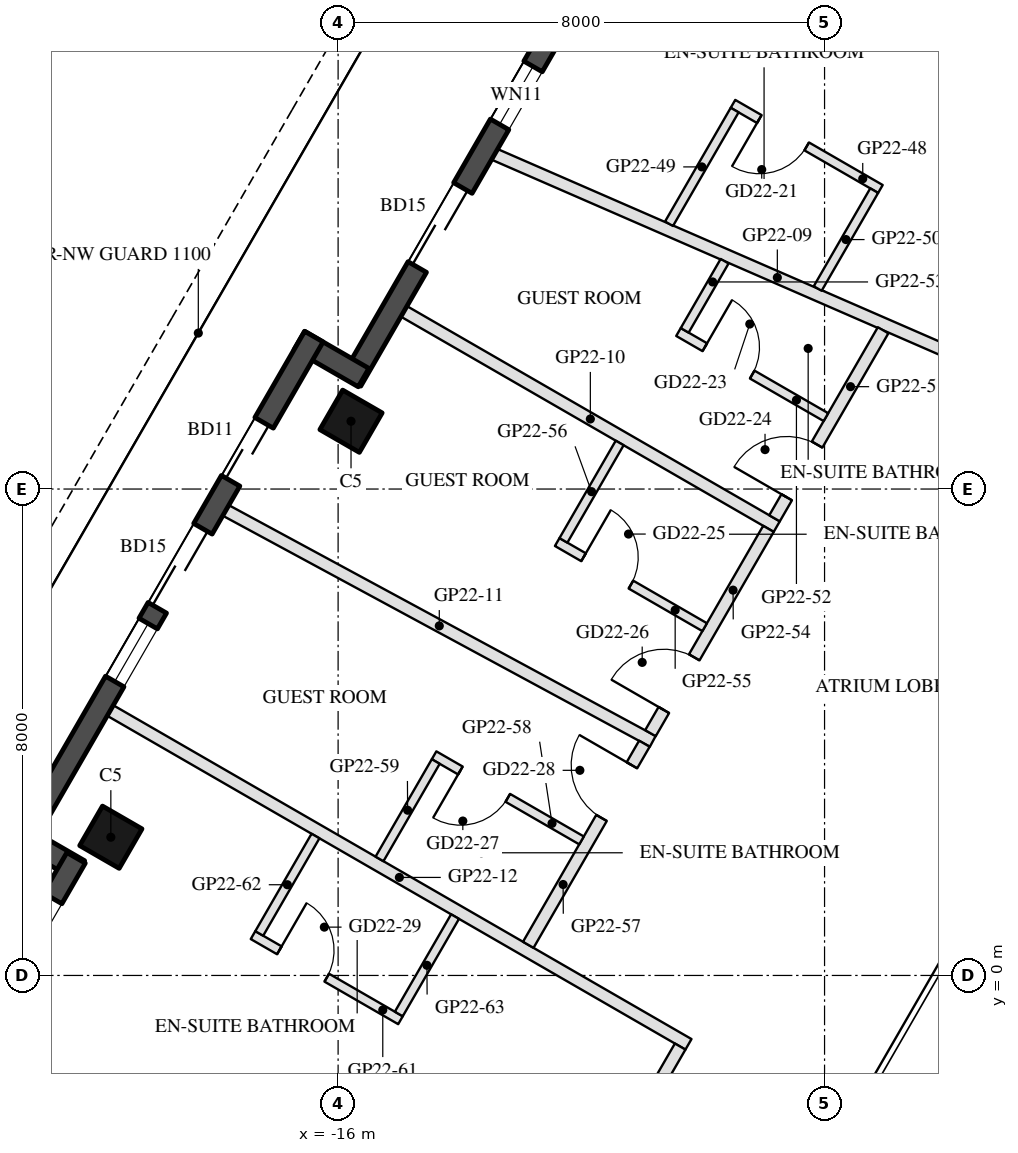
"""IFC4 building model, lengths in metres.
Left out: names, types, materials, properties, quantities, classifications, styles, units other than length and angle.
Written with IfcOpenShell. Run it as: python <this file> out.ifc"""

import sys

from ifc_helpers import new_model, si_unit, direction, frame, frame_2d, origin, origin_2d, place, context, subcontext, project, spatial, rectangle, hollow_rectangle, extrude, element, fill, save


model = new_model("IFC4")
c1 = context("Model", 3, precision=1e-05, world=origin(), true_north=direction((0.0, 1.0)))
c2 = subcontext(c1, "Body", "Model", "MODEL_VIEW")
j1 = project(units=[si_unit("LENGTHUNIT", "METRE"), si_unit("PLANEANGLEUNIT", "RADIAN")], contexts=[c1])
p1 = place(None, origin())
s1 = spatial("IfcSite", under=j1, at=p1, CompositionType="ELEMENT")
p2 = place(p1, origin())
s2 = spatial("IfcBuilding", under=s1, at=p2, CompositionType="ELEMENT")
p3 = place(p2, frame((0.0, 0.0, 228.0)))
s3 = spatial("IfcBuildingStorey", under=s2, at=p3, CompositionType="ELEMENT", Elevation=228.0)
for number, where, z_axis, x_axis in (
    (1, (-15.788, 9.115, 0.0), (0.0, 0.0, 1.0), (0.5, 0.866, 0.0)),
    (2, (-19.738, 2.273, 0.0), (0.0, 0.0, 1.0), (0.5, 0.866, 0.0)),
):
    element("IfcColumn", number, at=place(p3, frame(where, z_axis=z_axis, x_axis=x_axis)), inside=s3, PredefinedType="COLUMN", context=c2, shape_type="SweptSolid", body=[
        extrude(hollow_rectangle(XDim=0.75, YDim=0.75, WallThickness=0.035, at=origin_2d()), origin(), (0.0, 0.0, 1.0), 3.7),
    ])
p4 = place(p3, frame((-12.409, 15.617, 0.0), z_axis=(0.0, 0.0, 1.0), x_axis=(-0.500003597184, -0.866023326939, 0.0)))
e3 = element("IfcWall", 3, at=p4, inside=s3, PredefinedType="SOLIDWALL", context=c2, shape_type="SweptSolid", body=[
    extrude(rectangle(XDim=6.74, YDim=0.35, at=frame_2d((3.37, 0.0))), origin(), (0.0, 0.0, 1.0), 3.45),
])
p5 = place(p4, frame((0.77, 0.0, 0.3)))
e4 = element("IfcOpeningElement", 4, at=p5, cuts=e3, PredefinedType="OPENING", context=c2, shape_type="SweptSolid", body=[
    extrude(rectangle(XDim=1.1, YDim=2.65, at=frame_2d((0.55, 1.325))), frame((0.0, 0.185, 0.0), z_axis=(0.0, -1.0, 0.0), x_axis=(1.0, 0.0, 0.0)), (0.0, 0.0, 1.0), 0.37),
])
p6 = place(p4, frame((3.079, 0.0, 0.0)))
e5 = element("IfcOpeningElement", 5, at=p6, cuts=e3, PredefinedType="OPENING", context=c2, shape_type="SweptSolid", body=[
    extrude(rectangle(XDim=1.5, YDim=2.4, at=frame_2d((0.75, 1.2))), frame((0.0, 0.185, 0.0), z_axis=(0.0, -1.0, 0.0), x_axis=(1.0, 0.0, 0.0)), (0.0, 0.0, 1.0), 0.37),
])
p7 = place(p3, frame((-15.581, 9.833, 0.0), z_axis=(0.0, 0.0, 1.0), x_axis=(-0.866055662726, 0.499947586314, 0.0)))
e6 = element("IfcWall", 6, at=p7, inside=s3, PredefinedType="SOLIDWALL", context=c2, shape_type="SweptSolid", body=[
    extrude(rectangle(XDim=1.22, YDim=0.35, at=frame_2d((0.61, 0.0))), origin(), (0.0, 0.0, 1.0), 3.45),
])
p8 = place(p3, frame((-16.398, 10.507, 0.0), z_axis=(0.0, 0.0, 1.0), x_axis=(-0.499999142773, -0.866025898704, 0.0)))
e7 = element("IfcWall", 7, at=p8, inside=s3, PredefinedType="SOLIDWALL", context=c2, shape_type="SweptSolid", body=[
    extrude(rectangle(XDim=9.7, YDim=0.35, at=frame_2d((4.85, 0.0))), origin(), (0.0, 0.0, 1.0), 3.45),
])
p9 = place(p8, frame((1.638, 0.0, 0.0)))
e8 = element("IfcOpeningElement", 8, at=p9, cuts=e7, PredefinedType="OPENING", context=c2, shape_type="SweptSolid", body=[
    extrude(rectangle(XDim=1.1, YDim=2.4, at=frame_2d((0.55, 1.2))), frame((0.0, 0.185, 0.0), z_axis=(0.0, -1.0, 0.0), x_axis=(1.0, 0.0, 0.0)), (0.0, 0.0, 1.0), 0.37),
])
p10 = place(p8, frame((3.65, 0.0, 0.0)))
e9 = element("IfcOpeningElement", 9, at=p10, cuts=e7, PredefinedType="OPENING", context=c2, shape_type="SweptSolid", body=[
    extrude(rectangle(XDim=1.5, YDim=2.4, at=frame_2d((0.75, 1.2))), frame((0.0, 0.185, 0.0), z_axis=(0.0, -1.0, 0.0), x_axis=(1.0, 0.0, 0.0)), (0.0, 0.0, 1.0), 0.37),
])
p11 = place(p8, frame((5.45, 0.0, 0.3)))
e10 = element("IfcOpeningElement", 10, at=p11, cuts=e7, PredefinedType="OPENING", context=c2, shape_type="SweptSolid", body=[
    extrude(rectangle(XDim=1.1, YDim=2.65, at=frame_2d((0.55, 1.325))), frame((0.0, 0.185, 0.0), z_axis=(0.0, -1.0, 0.0), x_axis=(1.0, 0.0, 0.0)), (0.0, 0.0, 1.0), 0.37),
])
p12 = place(p3, frame((-21.312, 2.346, 0.0), z_axis=(0.0, 0.0, 1.0), x_axis=(0.866005645448, -0.500034220881, 0.0)))
e11 = element("IfcWall", 11, at=p12, inside=s3, PredefinedType="SOLIDWALL", context=c2, shape_type="SweptSolid", body=[
    extrude(rectangle(XDim=1.22, YDim=0.35, at=frame_2d((0.61, 0.0))), origin(), (0.0, 0.0, 1.0), 3.45),
])
p13 = place(p3, frame((-20.309, 1.934, 0.0), z_axis=(0.0, 0.0, 1.0), x_axis=(-0.499992114976, -0.866029956157, 0.0)))
e12 = element("IfcWall", 12, at=p13, inside=s3, PredefinedType="SOLIDWALL", context=c2, shape_type="SweptSolid", body=[
    extrude(rectangle(XDim=6.74, YDim=0.35, at=frame_2d((3.37, 0.0))), origin(), (0.0, 0.0, 1.0), 3.45),
])
p14 = place(p13, frame((4.02, 0.0, 0.0)))
e13 = element("IfcOpeningElement", 13, at=p14, cuts=e12, PredefinedType="OPENING", context=c2, shape_type="SweptSolid", body=[
    extrude(rectangle(XDim=2.4, YDim=2.4, at=frame_2d((1.2, 1.2))), frame((0.0, 0.185, 0.0), z_axis=(0.0, -1.0, 0.0), x_axis=(1.0, 0.0, 0.0)), (0.0, 0.0, 1.0), 0.37),
])
p15 = place(p13, frame((0.77, 0.0, 0.3)))
e14 = element("IfcOpeningElement", 14, at=p15, cuts=e12, PredefinedType="OPENING", context=c2, shape_type="SweptSolid", body=[
    extrude(rectangle(XDim=2.9, YDim=2.65, at=frame_2d((1.45, 1.325))), frame((0.0, 0.185, 0.0), z_axis=(0.0, -1.0, 0.0), x_axis=(1.0, 0.0, 0.0)), (0.0, 0.0, 1.0), 0.37),
])
p16 = place(p3, frame((-13.427, 13.504, 0.0), z_axis=(0.0, 0.0, 1.0), x_axis=(0.916759471343, -0.399439697204, 0.0)))
e15 = element("IfcWall", 15, at=p16, inside=s3, PredefinedType="PARTITIONING", context=c2, shape_type="SweptSolid", body=[
    extrude(rectangle(XDim=10.144, YDim=0.2, at=frame_2d((5.072, 0.0))), origin(), (0.0, 0.0, 1.0), 2.96),
])
p17 = place(p3, frame((-14.917, 10.922, 0.0), z_axis=(0.0, 0.0, 1.0), x_axis=(0.866019052629, -0.500011000363, 0.0)))
e16 = element("IfcWall", 16, at=p17, inside=s3, PredefinedType="PARTITIONING", context=c2, shape_type="SweptSolid", body=[
    extrude(rectangle(XDim=7.08, YDim=0.2, at=frame_2d((3.54, 0.0))), origin(), (0.0, 0.0, 1.0), 2.96),
])
p18 = place(p3, frame((-17.847, 7.648, 0.0), z_axis=(0.0, 0.0, 1.0), x_axis=(0.879604495132, -0.475705720109, 0.0)))
e17 = element("IfcWall", 17, at=p18, inside=s3, PredefinedType="PARTITIONING", context=c2, shape_type="SweptSolid", body=[
    extrude(rectangle(XDim=7.983, YDim=0.2, at=frame_2d((3.992, 0.0))), origin(), (0.0, 0.0, 1.0), 2.96),
])
p19 = place(p3, frame((-19.747, 4.357, 0.0), z_axis=(0.0, 0.0, 1.0), x_axis=(0.866027479907, -0.499996404033, 0.0)))
e18 = element("IfcWall", 18, at=p19, inside=s3, PredefinedType="PARTITIONING", context=c2, shape_type="SweptSolid", body=[
    extrude(rectangle(XDim=10.98, YDim=0.2, at=frame_2d((5.49, 0.0))), origin(), (0.0, 0.0, 1.0), 2.96),
])
p20 = place(p3, frame((-7.081, 12.935, 0.0), z_axis=(0.0, 0.0, 1.0), x_axis=(-0.866056369097, 0.49994636267, 0.0)))
e19 = element("IfcWall", 19, at=p20, inside=s3, PredefinedType="PARTITIONING", context=c2, shape_type="SweptSolid", body=[
    extrude(rectangle(XDim=2.8, YDim=0.15, at=frame_2d((1.4, 0.0))), origin(), (0.0, 0.0, 1.0), 3.45),
])
p21 = place(p20, frame((1.4, 0.0, 0.0)))
e20 = element("IfcOpeningElement", 20, at=p21, cuts=e19, PredefinedType="OPENING", context=c2, shape_type="SweptSolid", body=[
    extrude(rectangle(XDim=0.9, YDim=2.1, at=frame_2d((0.45, 1.05))), frame((0.0, 0.085, 0.0), z_axis=(0.0, -1.0, 0.0), x_axis=(1.0, 0.0, 0.0)), (0.0, 0.0, 1.0), 0.17),
])
p22 = place(p3, frame((-9.479, 14.233, 0.0), z_axis=(0.0, 0.0, 1.0), x_axis=(-0.499983569942, -0.866034889475, 0.0)))
e21 = element("IfcWall", 21, at=p22, inside=s3, PredefinedType="PARTITIONING", context=c2, shape_type="SweptSolid", body=[
    extrude(rectangle(XDim=2.158, YDim=0.15, at=frame_2d((1.079, 0.0))), origin(), (0.0, 0.0, 1.0), 3.45),
])
p23 = place(p3, frame((-7.184, 12.908, 0.0), z_axis=(0.0, 0.0, 1.0), x_axis=(-0.49995366312, -0.866052154742, 0.0)))
e22 = element("IfcWall", 22, at=p23, inside=s3, PredefinedType="PARTITIONING", context=c2, shape_type="SweptSolid", body=[
    extrude(rectangle(XDim=1.859, YDim=0.15, at=frame_2d((0.929, 0.0))), origin(), (0.0, 0.0, 1.0), 3.45),
])
p24 = place(p3, frame((-8.823, 7.519, 0.0), z_axis=(0.0, 0.0, 1.0), x_axis=(0.500036104519, 0.866004557827, 0.0)))
e23 = element("IfcWall", 23, at=p24, inside=s3, PredefinedType="PARTITIONING", context=c2, shape_type="SweptSolid", body=[
    extrude(rectangle(XDim=3.571, YDim=0.2, at=frame_2d((1.786, 0.0))), origin(), (0.0, 0.0, 1.0), 2.76),
])
p25 = place(p24, frame((0.4, 0.0, 0.0)))
e24 = element("IfcOpeningElement", 24, at=p25, cuts=e23, PredefinedType="OPENING", context=c2, shape_type="SweptSolid", body=[
    extrude(rectangle(XDim=1.0, YDim=2.1, at=frame_2d((0.5, 1.05))), frame((0.0, 0.11, 0.0), z_axis=(0.0, -1.0, 0.0), x_axis=(1.0, 0.0, 0.0)), (0.0, 0.0, 1.0), 0.22),
])
p26 = place(p3, frame((-10.402, 10.583, 0.0), z_axis=(0.0, 0.0, 1.0), x_axis=(0.866034573852, -0.49998411664, 0.0)))
e25 = element("IfcWall", 25, at=p26, inside=s3, PredefinedType="PARTITIONING", context=c2, shape_type="SweptSolid", body=[
    extrude(rectangle(XDim=2.8, YDim=0.15, at=frame_2d((1.4, 0.0))), origin(), (0.0, 0.0, 1.0), 2.76),
])
p27 = place(p26, frame((0.5, 0.0, 0.0)))
e26 = element("IfcOpeningElement", 26, at=p27, cuts=e25, PredefinedType="OPENING", context=c2, shape_type="SweptSolid", body=[
    extrude(rectangle(XDim=0.9, YDim=2.1, at=frame_2d((0.45, 1.05))), frame((0.0, 0.085, 0.0), z_axis=(0.0, -1.0, 0.0), x_axis=(1.0, 0.0, 0.0)), (0.0, 0.0, 1.0), 0.17),
])
p28 = place(p3, frame((-9.644, 11.747, 0.0), z_axis=(0.0, 0.0, 1.0), x_axis=(-0.499899541988, -0.866083395476, 0.0)))
e27 = element("IfcWall", 27, at=p28, inside=s3, PredefinedType="PARTITIONING", context=c2, shape_type="SweptSolid", body=[
    extrude(rectangle(XDim=1.313, YDim=0.15, at=frame_2d((0.656, 0.0))), origin(), (0.0, 0.0, 1.0), 2.76),
])
p29 = place(p3, frame((-10.863, 3.985, 0.0), z_axis=(0.0, 0.0, 1.0), x_axis=(0.500009256921, 0.866020059232, 0.0)))
e28 = element("IfcWall", 28, at=p29, inside=s3, PredefinedType="PARTITIONING", context=c2, shape_type="SweptSolid", body=[
    extrude(rectangle(XDim=3.881, YDim=0.2, at=frame_2d((1.94, 0.0))), origin(), (0.0, 0.0, 1.0), 2.76),
])
p30 = place(p29, frame((0.44, 0.0, 0.0)))
e29 = element("IfcOpeningElement", 29, at=p30, cuts=e28, PredefinedType="OPENING", context=c2, shape_type="SweptSolid", body=[
    extrude(rectangle(XDim=1.0, YDim=2.1, at=frame_2d((0.5, 1.05))), frame((0.0, 0.11, 0.0), z_axis=(0.0, -1.0, 0.0), x_axis=(1.0, 0.0, 0.0)), (0.0, 0.0, 1.0), 0.22),
])
p31 = place(p3, frame((-12.397, 7.128, 0.0), z_axis=(0.0, 0.0, 1.0), x_axis=(0.866018616679, -0.500011755427, 0.0)))
e30 = element("IfcWall", 30, at=p31, inside=s3, PredefinedType="PARTITIONING", context=c2, shape_type="SweptSolid", body=[
    extrude(rectangle(XDim=2.8, YDim=0.15, at=frame_2d((1.4, 0.0))), origin(), (0.0, 0.0, 1.0), 2.76),
])
p32 = place(p31, frame((0.5, 0.0, 0.0)))
e31 = element("IfcOpeningElement", 31, at=p32, cuts=e30, PredefinedType="OPENING", context=c2, shape_type="SweptSolid", body=[
    extrude(rectangle(XDim=0.9, YDim=2.1, at=frame_2d((0.45, 1.05))), frame((0.0, 0.085, 0.0), z_axis=(0.0, -1.0, 0.0), x_axis=(1.0, 0.0, 0.0)), (0.0, 0.0, 1.0), 0.17),
])
p33 = place(p3, frame((-11.369, 8.758, 0.0), z_axis=(0.0, 0.0, 1.0), x_axis=(-0.500042316284, -0.866000971088, 0.0)))
e32 = element("IfcWall", 32, at=p33, inside=s3, PredefinedType="PARTITIONING", context=c2, shape_type="SweptSolid", body=[
    extrude(rectangle(XDim=1.85, YDim=0.15, at=frame_2d((0.925, 0.0))), origin(), (0.0, 0.0, 1.0), 2.76),
])
p34 = place(p3, frame((-12.873, 0.504, 0.0), z_axis=(0.0, 0.0, 1.0), x_axis=(0.500030487836, 0.866007800909, 0.0)))
e33 = element("IfcWall", 33, at=p34, inside=s3, PredefinedType="PARTITIONING", context=c2, shape_type="SweptSolid", body=[
    extrude(rectangle(XDim=3.819, YDim=0.2, at=frame_2d((1.91, 0.0))), origin(), (0.0, 0.0, 1.0), 2.76),
])
p35 = place(p34, frame((2.41, 0.0, 0.0)))
e34 = element("IfcOpeningElement", 34, at=p35, cuts=e33, PredefinedType="OPENING", context=c2, shape_type="SweptSolid", body=[
    extrude(rectangle(XDim=1.0, YDim=2.1, at=frame_2d((0.5, 1.05))), frame((0.0, 0.11, 0.0), z_axis=(0.0, -1.0, 0.0), x_axis=(1.0, 0.0, 0.0)), (0.0, 0.0, 1.0), 0.22),
])
p36 = place(p3, frame((-11.997, 2.221, 0.0), z_axis=(0.0, 0.0, 1.0), x_axis=(-0.866034573852, 0.49998411664, 0.0)))
e35 = element("IfcWall", 35, at=p36, inside=s3, PredefinedType="PARTITIONING", context=c2, shape_type="SweptSolid", body=[
    extrude(rectangle(XDim=2.8, YDim=0.15, at=frame_2d((1.4, 0.0))), origin(), (0.0, 0.0, 1.0), 2.76),
])
p37 = place(p36, frame((1.4, 0.0, 0.0)))
e36 = element("IfcOpeningElement", 36, at=p37, cuts=e35, PredefinedType="OPENING", context=c2, shape_type="SweptSolid", body=[
    extrude(rectangle(XDim=0.9, YDim=2.1, at=frame_2d((0.45, 1.05))), frame((0.0, 0.085, 0.0), z_axis=(0.0, -1.0, 0.0), x_axis=(1.0, 0.0, 0.0)), (0.0, 0.0, 1.0), 0.17),
])
p38 = place(p3, frame((-14.394, 3.519, 0.0), z_axis=(0.0, 0.0, 1.0), x_axis=(-0.499886193382, -0.866091100096, 0.0)))
e37 = element("IfcWall", 37, at=p38, inside=s3, PredefinedType="PARTITIONING", context=c2, shape_type="SweptSolid", body=[
    extrude(rectangle(XDim=1.85, YDim=0.15, at=frame_2d((0.925, 0.0))), origin(), (0.0, 0.0, 1.0), 3.45),
])
p39 = place(p3, frame((-12.269, -4.45, 0.0), z_axis=(0.0, 0.0, 1.0), x_axis=(0.500055316652, 0.865993464345, 0.0)))
e38 = element("IfcWall", 38, at=p39, inside=s3, PredefinedType="PARTITIONING", context=c2, shape_type="SweptSolid", body=[
    extrude(rectangle(XDim=3.788, YDim=0.2, at=frame_2d((1.894, 0.0))), origin(), (0.0, 0.0, 1.0), 2.76),
])
p40 = place(p39, frame((1.394, 0.0, 0.0)))
e39 = element("IfcOpeningElement", 39, at=p40, cuts=e38, PredefinedType="OPENING", context=c2, shape_type="SweptSolid", body=[
    extrude(rectangle(XDim=1.0, YDim=2.1, at=frame_2d((0.5, 1.05))), frame((0.0, 0.11, 0.0), z_axis=(0.0, -1.0, 0.0), x_axis=(1.0, 0.0, 0.0)), (0.0, 0.0, 1.0), 0.22),
])
p41 = place(p3, frame((-17.399, 0.664, 0.0), z_axis=(0.0, 0.0, 1.0), x_axis=(0.866018616679, -0.500011755427, 0.0)))
e40 = element("IfcWall", 40, at=p41, inside=s3, PredefinedType="PARTITIONING", context=c2, shape_type="SweptSolid", body=[
    extrude(rectangle(XDim=2.8, YDim=0.15, at=frame_2d((1.4, 0.0))), origin(), (0.0, 0.0, 1.0), 3.45),
])
p42 = place(p41, frame((0.5, 0.0, 0.0)))
e41 = element("IfcOpeningElement", 41, at=p42, cuts=e40, PredefinedType="OPENING", context=c2, shape_type="SweptSolid", body=[
    extrude(rectangle(XDim=0.9, YDim=2.1, at=frame_2d((0.45, 1.05))), frame((0.0, 0.085, 0.0), z_axis=(0.0, -1.0, 0.0), x_axis=(1.0, 0.0, 0.0)), (0.0, 0.0, 1.0), 0.17),
])
p43 = place(p3, frame((-16.372, 2.293, 0.0), z_axis=(0.0, 0.0, 1.0), x_axis=(-0.499985172903, -0.866033964044, 0.0)))
e42 = element("IfcWall", 42, at=p43, inside=s3, PredefinedType="PARTITIONING", context=c2, shape_type="SweptSolid", body=[
    extrude(rectangle(XDim=1.85, YDim=0.15, at=frame_2d((0.925, 0.0))), origin(), (0.0, 0.0, 1.0), 2.76),
])
p44 = place(p3, frame((-14.077, 0.968, 0.0), z_axis=(0.0, 0.0, 1.0), x_axis=(-0.500042316284, -0.866000971088, 0.0)))
e43 = element("IfcWall", 43, at=p44, inside=s3, PredefinedType="PARTITIONING", context=c2, shape_type="SweptSolid", body=[
    extrude(rectangle(XDim=1.85, YDim=0.15, at=frame_2d((0.925, 0.0))), origin(), (0.0, 0.0, 1.0), 2.76),
])
p45 = place(p5, origin())
e44 = element("IfcWindow", 44, at=p45, inside=s3, PartitioningType="SINGLE_PANEL", PredefinedType="WINDOW", context=c2, shape_type="SweptSolid", body=[
    extrude(rectangle(XDim=1.1, YDim=2.65, at=frame_2d((0.55, 1.325))), frame((0.0, 0.03, 0.0), z_axis=(0.0, -1.0, 0.0), x_axis=(1.0, 0.0, 0.0)), (0.0, 0.0, 1.0), 0.06),
])
fill(e4, e44)
p46 = place(p6, frame((1.5, 0.0, 0.0), z_axis=(0.0, 0.0, 1.0), x_axis=(-1.0, 0.0, 0.0)))
e45 = element("IfcDoor", 45, at=p46, inside=s3, OperationType="SLIDING_TO_LEFT", PredefinedType="DOOR", context=c2, shape_type="SweptSolid", body=[
    extrude(rectangle(XDim=1.5, YDim=2.4, at=frame_2d((0.75, 1.2))), frame((0.0, 0.025, 0.0), z_axis=(0.0, -1.0, 0.0), x_axis=(1.0, 0.0, 0.0)), (0.0, 0.0, 1.0), 0.05),
])
fill(e5, e45)
p47 = place(p9, frame((1.1, 0.0, 0.0), z_axis=(0.0, 0.0, 1.0), x_axis=(-1.0, 0.0, 0.0)))
e46 = element("IfcDoor", 46, at=p47, inside=s3, OperationType="SLIDING_TO_LEFT", PredefinedType="DOOR", context=c2, shape_type="SweptSolid", body=[
    extrude(rectangle(XDim=1.1, YDim=2.4, at=frame_2d((0.55, 1.2))), frame((0.0, 0.025, 0.0), z_axis=(0.0, -1.0, 0.0), x_axis=(1.0, 0.0, 0.0)), (0.0, 0.0, 1.0), 0.05),
])
fill(e8, e46)
p48 = place(p10, frame((1.5, 0.0, 0.0), z_axis=(0.0, 0.0, 1.0), x_axis=(-1.0, 0.0, 0.0)))
e47 = element("IfcDoor", 47, at=p48, inside=s3, OperationType="SLIDING_TO_LEFT", PredefinedType="DOOR", context=c2, shape_type="SweptSolid", body=[
    extrude(rectangle(XDim=1.5, YDim=2.4, at=frame_2d((0.75, 1.2))), frame((0.0, 0.025, 0.0), z_axis=(0.0, -1.0, 0.0), x_axis=(1.0, 0.0, 0.0)), (0.0, 0.0, 1.0), 0.05),
])
fill(e9, e47)
p49 = place(p11, origin())
e48 = element("IfcWindow", 48, at=p49, inside=s3, PartitioningType="SINGLE_PANEL", PredefinedType="WINDOW", context=c2, shape_type="SweptSolid", body=[
    extrude(rectangle(XDim=1.1, YDim=2.65, at=frame_2d((0.55, 1.325))), frame((0.0, 0.03, 0.0), z_axis=(0.0, -1.0, 0.0), x_axis=(1.0, 0.0, 0.0)), (0.0, 0.0, 1.0), 0.06),
])
fill(e10, e48)
p50 = place(p15, origin())
e49 = element("IfcWindow", 49, at=p50, inside=s3, PartitioningType="SINGLE_PANEL", PredefinedType="WINDOW", context=c2, shape_type="SweptSolid", body=[
    extrude(rectangle(XDim=2.9, YDim=2.65, at=frame_2d((1.45, 1.325))), frame((0.0, 0.03, 0.0), z_axis=(0.0, -1.0, 0.0), x_axis=(1.0, 0.0, 0.0)), (0.0, 0.0, 1.0), 0.06),
])
fill(e14, e49)
p51 = place(p21, origin())
e50 = element("IfcDoor", 50, at=p51, inside=s3, OperationType="SINGLE_SWING_RIGHT", PredefinedType="DOOR", context=c2, shape_type="SweptSolid", body=[
    extrude(rectangle(XDim=0.9, YDim=2.1, at=frame_2d((0.45, 1.05))), frame((0.0, 0.025, 0.0), z_axis=(0.0, -1.0, 0.0), x_axis=(1.0, 0.0, 0.0)), (0.0, 0.0, 1.0), 0.05),
])
fill(e20, e50)
p52 = place(p27, origin())
e51 = element("IfcDoor", 51, at=p52, inside=s3, OperationType="SINGLE_SWING_LEFT", PredefinedType="DOOR", context=c2, shape_type="SweptSolid", body=[
    extrude(rectangle(XDim=0.9, YDim=2.1, at=frame_2d((0.45, 1.05))), frame((0.0, 0.025, 0.0), z_axis=(0.0, -1.0, 0.0), x_axis=(1.0, 0.0, 0.0)), (0.0, 0.0, 1.0), 0.05),
])
fill(e26, e51)
p53 = place(p25, origin())
e52 = element("IfcDoor", 52, at=p53, inside=s3, OperationType="SINGLE_SWING_LEFT", PredefinedType="DOOR", context=c2, shape_type="SweptSolid", body=[
    extrude(rectangle(XDim=1.0, YDim=2.1, at=frame_2d((0.5, 1.05))), frame((0.0, 0.025, 0.0), z_axis=(0.0, -1.0, 0.0), x_axis=(1.0, 0.0, 0.0)), (0.0, 0.0, 1.0), 0.05),
])
fill(e24, e52)
p54 = place(p32, origin())
e53 = element("IfcDoor", 53, at=p54, inside=s3, OperationType="SINGLE_SWING_LEFT", PredefinedType="DOOR", context=c2, shape_type="SweptSolid", body=[
    extrude(rectangle(XDim=0.9, YDim=2.1, at=frame_2d((0.45, 1.05))), frame((0.0, 0.025, 0.0), z_axis=(0.0, -1.0, 0.0), x_axis=(1.0, 0.0, 0.0)), (0.0, 0.0, 1.0), 0.05),
])
fill(e31, e53)
p55 = place(p30, origin())
e54 = element("IfcDoor", 54, at=p55, inside=s3, OperationType="SINGLE_SWING_LEFT", PredefinedType="DOOR", context=c2, shape_type="SweptSolid", body=[
    extrude(rectangle(XDim=1.0, YDim=2.1, at=frame_2d((0.5, 1.05))), frame((0.0, 0.025, 0.0), z_axis=(0.0, -1.0, 0.0), x_axis=(1.0, 0.0, 0.0)), (0.0, 0.0, 1.0), 0.05),
])
fill(e29, e54)
p56 = place(p37, origin())
e55 = element("IfcDoor", 55, at=p56, inside=s3, OperationType="SINGLE_SWING_RIGHT", PredefinedType="DOOR", context=c2, shape_type="SweptSolid", body=[
    extrude(rectangle(XDim=0.9, YDim=2.1, at=frame_2d((0.45, 1.05))), frame((0.0, 0.025, 0.0), z_axis=(0.0, -1.0, 0.0), x_axis=(1.0, 0.0, 0.0)), (0.0, 0.0, 1.0), 0.05),
])
fill(e36, e55)
p57 = place(p35, origin())
e56 = element("IfcDoor", 56, at=p57, inside=s3, OperationType="SINGLE_SWING_RIGHT", PredefinedType="DOOR", context=c2, shape_type="SweptSolid", body=[
    extrude(rectangle(XDim=1.0, YDim=2.1, at=frame_2d((0.5, 1.05))), frame((0.0, 0.025, 0.0), z_axis=(0.0, -1.0, 0.0), x_axis=(1.0, 0.0, 0.0)), (0.0, 0.0, 1.0), 0.05),
])
fill(e34, e56)
p58 = place(p42, origin())
e57 = element("IfcDoor", 57, at=p58, inside=s3, OperationType="SINGLE_SWING_LEFT", PredefinedType="DOOR", context=c2, shape_type="SweptSolid", body=[
    extrude(rectangle(XDim=0.9, YDim=2.1, at=frame_2d((0.45, 1.05))), frame((0.0, 0.025, 0.0), z_axis=(0.0, -1.0, 0.0), x_axis=(1.0, 0.0, 0.0)), (0.0, 0.0, 1.0), 0.05),
])
fill(e41, e57)
save(model, sys.argv[1])
